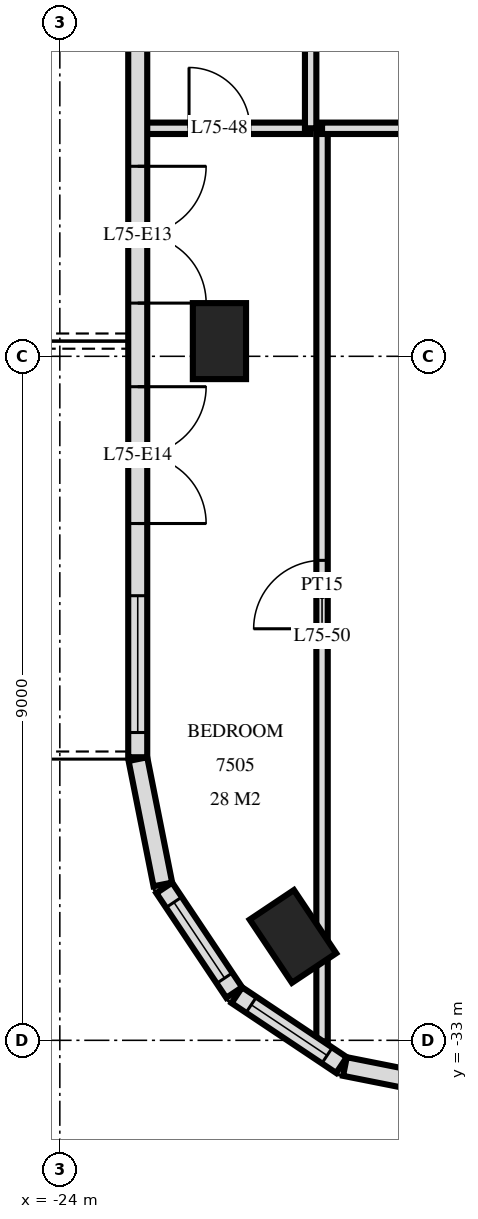
"""IFC4 building model, lengths in metres.
Left out: names, types, materials, properties, quantities, classifications, styles, units other than length and angle.
Written with IfcOpenShell. Run it as: python <this file> out.ifc"""

import sys

from ifc_helpers import new_model, si_unit, direction, frame, frame_2d, origin, origin_2d, place, context, subcontext, project, spatial, rectangle, extrude, element, fill, save


model = new_model("IFC4")
c1 = context("Model", 3, precision=1e-05, world=origin(), true_north=direction((0.0, 1.0)))
c2 = subcontext(c1, "Body", "Model", "MODEL_VIEW")
j1 = project(units=[si_unit("LENGTHUNIT", "METRE"), si_unit("PLANEANGLEUNIT", "RADIAN")], contexts=[c1])
p1 = place(None, origin())
s1 = spatial("IfcSite", under=j1, at=p1, CompositionType="ELEMENT")
p2 = place(p1, origin())
s2 = spatial("IfcBuilding", under=s1, at=p2, CompositionType="ELEMENT")
p3 = place(p2, frame((0.0, 0.0, 284.1)))
s3 = spatial("IfcBuildingStorey", under=s2, at=p3, CompositionType="ELEMENT", Elevation=284.1)
for number, where, z_axis, x_axis in (
    (1, (-21.9, -23.8, 0.0), (0.0, 0.0, 1.0), (0.0, 1.0, 0.0)),
    (2, (-20.933, -31.633, 0.0), (0.0, 0.0, 1.0), (-0.556, 0.831, 0.0)),
):
    element("IfcColumn", number, at=place(p3, frame(where, z_axis=z_axis, x_axis=x_axis)), inside=s3, PredefinedType="COLUMN", context=c2, shape_type="SweptSolid", body=[
        extrude(rectangle(XDim=1.0, YDim=0.7, at=origin_2d()), origin(), (0.0, 0.0, 1.0), 3.5),
    ])
p4 = place(p3, frame((-22.975, -3.325, 0.0), z_axis=(0.0, 0.0, 1.0), x_axis=(0.0, -1.0, 0.0)))
e3 = element("IfcWall", 3, at=p4, inside=s3, PredefinedType="SOLIDWALL", context=c2, shape_type="SweptSolid", body=[
    extrude(rectangle(XDim=25.951, YDim=0.25, at=frame_2d((12.975, 0.0))), origin(), (0.0, 0.0, 1.0), 3.22),
])
p5 = place(p4, frame((1.475, 0.0, 0.0)))
e4 = element("IfcOpeningElement", 4, at=p5, cuts=e3, PredefinedType="OPENING", context=c2, shape_type="SweptSolid", body=[
    extrude(rectangle(XDim=1.8, YDim=2.4, at=frame_2d((0.9, 1.2))), frame((0.0, 0.135, 0.0), z_axis=(0.0, -1.0, 0.0), x_axis=(1.0, 0.0, 0.0)), (0.0, 0.0, 1.0), 0.27),
])
p6 = place(p4, frame((7.975, 0.0, 0.0)))
e5 = element("IfcOpeningElement", 5, at=p6, cuts=e3, PredefinedType="OPENING", context=c2, shape_type="SweptSolid", body=[
    extrude(rectangle(XDim=1.8, YDim=2.4, at=frame_2d((0.9, 1.2))), frame((0.0, 0.135, 0.0), z_axis=(0.0, -1.0, 0.0), x_axis=(1.0, 0.0, 0.0)), (0.0, 0.0, 1.0), 0.27),
])
p7 = place(p4, frame((18.175, 0.0, 0.0)))
e6 = element("IfcOpeningElement", 6, at=p7, cuts=e3, PredefinedType="OPENING", context=c2, shape_type="SweptSolid", body=[
    extrude(rectangle(XDim=1.8, YDim=2.4, at=frame_2d((0.9, 1.2))), frame((0.0, 0.135, 0.0), z_axis=(0.0, -1.0, 0.0), x_axis=(1.0, 0.0, 0.0)), (0.0, 0.0, 1.0), 0.27),
])
p8 = place(p4, frame((21.075, 0.0, 0.0)))
e7 = element("IfcOpeningElement", 7, at=p8, cuts=e3, PredefinedType="OPENING", context=c2, shape_type="SweptSolid", body=[
    extrude(rectangle(XDim=1.8, YDim=2.4, at=frame_2d((0.9, 1.2))), frame((0.0, 0.135, 0.0), z_axis=(0.0, -1.0, 0.0), x_axis=(1.0, 0.0, 0.0)), (0.0, 0.0, 1.0), 0.27),
])
p9 = place(p4, frame((23.825, 0.0, 0.9)))
e8 = element("IfcOpeningElement", 8, at=p9, cuts=e3, PredefinedType="OPENING", context=c2, shape_type="SweptSolid", body=[
    extrude(rectangle(XDim=1.8, YDim=1.5, at=frame_2d((0.9, 0.75))), frame((0.0, 0.135, 0.0), z_axis=(0.0, -1.0, 0.0), x_axis=(1.0, 0.0, 0.0)), (0.0, 0.0, 1.0), 0.27),
])
p10 = place(p3, frame((-22.973, -29.3, 0.0), z_axis=(0.0, 0.0, 1.0), x_axis=(0.19513878023, -0.980775640221, 0.0)))
e9 = element("IfcWall", 9, at=p10, inside=s3, PredefinedType="SOLIDWALL", context=c2, shape_type="SweptSolid", body=[
    extrude(rectangle(XDim=1.681, YDim=0.25, at=frame_2d((0.841, 0.0))), origin(), (0.0, 0.0, 1.0), 3.22),
])
p11 = place(p3, frame((-22.626, -30.994, 0.0), z_axis=(0.0, 0.0, 1.0), x_axis=(0.55555029066, -0.831482937015, 0.0)))
e10 = element("IfcWall", 10, at=p11, inside=s3, PredefinedType="SOLIDWALL", context=c2, shape_type="SweptSolid", body=[
    extrude(rectangle(XDim=1.656, YDim=0.25, at=frame_2d((0.828, 0.0))), origin(), (0.0, 0.0, 1.0), 3.22),
])
p12 = place(p11, frame((0.228, 0.0, 0.9)))
e11 = element("IfcOpeningElement", 11, at=p12, cuts=e10, PredefinedType="OPENING", context=c2, shape_type="SweptSolid", body=[
    extrude(rectangle(XDim=1.2, YDim=1.5, at=frame_2d((0.6, 0.75))), frame((0.0, 0.135, 0.0), z_axis=(0.0, -1.0, 0.0), x_axis=(1.0, 0.0, 0.0)), (0.0, 0.0, 1.0), 0.27),
])
p13 = place(p3, frame((-21.671, -32.406, 0.0), z_axis=(0.0, 0.0, 1.0), x_axis=(0.831482937015, -0.55555029066, 0.0)))
e12 = element("IfcWall", 12, at=p13, inside=s3, PredefinedType="SOLIDWALL", context=c2, shape_type="SweptSolid", body=[
    extrude(rectangle(XDim=1.656, YDim=0.25, at=frame_2d((0.828, 0.0))), origin(), (0.0, 0.0, 1.0), 3.22),
])
p14 = place(p13, frame((0.228, 0.0, 0.9)))
e13 = element("IfcOpeningElement", 13, at=p14, cuts=e12, PredefinedType="OPENING", context=c2, shape_type="SweptSolid", body=[
    extrude(rectangle(XDim=1.2, YDim=1.5, at=frame_2d((0.6, 0.75))), frame((0.0, 0.135, 0.0), z_axis=(0.0, -1.0, 0.0), x_axis=(1.0, 0.0, 0.0)), (0.0, 0.0, 1.0), 0.27),
])
p15 = place(p3, frame((-20.249, -33.344, 0.0), z_axis=(0.0, 0.0, 1.0), x_axis=(0.980770110232, -0.195166572128, 0.0)))
e14 = element("IfcWall", 14, at=p15, inside=s3, PredefinedType="SOLIDWALL", context=c2, shape_type="SweptSolid", body=[
    extrude(rectangle(XDim=1.681, YDim=0.25, at=frame_2d((0.841, 0.0))), origin(), (0.0, 0.0, 1.0), 3.22),
])
p16 = place(p3, frame((-20.55, -33.017, 0.0), z_axis=(0.0, 0.0, 1.0), x_axis=(0.0, 1.0, 0.0)))
e15 = element("IfcWall", 15, at=p16, inside=s3, PredefinedType="PARTITIONING", context=c2, shape_type="SweptSolid", body=[
    extrude(rectangle(XDim=12.017, YDim=0.15, at=frame_2d((6.008, 0.0))), origin(), (0.0, 0.0, 1.0), 3.22),
])
p17 = place(p16, frame((5.432, 0.0, 0.0)))
e16 = element("IfcOpeningElement", 16, at=p17, cuts=e15, PredefinedType="OPENING", context=c2, shape_type="SweptSolid", body=[
    extrude(rectangle(XDim=0.9, YDim=2.1, at=frame_2d((0.45, 1.05))), frame((0.0, 0.085, 0.0), z_axis=(0.0, -1.0, 0.0), x_axis=(1.0, 0.0, 0.0)), (0.0, 0.0, 1.0), 0.17),
])
p18 = place(p3, frame((-20.7, -21.0, 0.0), z_axis=(0.0, 0.0, 1.0), x_axis=(0.0, 1.0, 0.0)))
e17 = element("IfcWall", 17, at=p18, inside=s3, PredefinedType="PARTITIONING", context=c2, shape_type="SweptSolid", body=[
    extrude(rectangle(XDim=4.2, YDim=0.15, at=frame_2d((2.1, 0.0))), origin(), (0.0, 0.0, 1.0), 3.22),
])
p19 = place(p3, frame((-22.92, -21.0, 0.0), z_axis=(0.0, 0.0, 1.0), x_axis=(1.0, 0.0, 0.0)))
e18 = element("IfcWall", 18, at=p19, inside=s3, PredefinedType="PARTITIONING", context=c2, shape_type="SweptSolid", body=[
    extrude(rectangle(XDim=2.22, YDim=0.15, at=frame_2d((1.11, 0.0))), origin(), (0.0, 0.0, 1.0), 3.22),
])
p20 = place(p19, frame((0.62, 0.0, 0.0)))
e19 = element("IfcOpeningElement", 19, at=p20, cuts=e18, PredefinedType="OPENING", context=c2, shape_type="SweptSolid", body=[
    extrude(rectangle(XDim=0.8, YDim=2.1, at=frame_2d((0.4, 1.05))), frame((0.0, 0.085, 0.0), z_axis=(0.0, -1.0, 0.0), x_axis=(1.0, 0.0, 0.0)), (0.0, 0.0, 1.0), 0.17),
])
p21 = place(p3, frame((-20.55, -21.0, 0.0), z_axis=(0.0, 0.0, 1.0), x_axis=(1.0, 0.0, 0.0)))
e20 = element("IfcWall", 20, at=p21, inside=s3, PredefinedType="PARTITIONING", context=c2, shape_type="SweptSolid", body=[
    extrude(rectangle(XDim=4.15, YDim=0.15, at=frame_2d((2.075, 0.0))), origin(), (0.0, 0.0, 1.0), 3.22),
])
p22 = place(p12, origin())
e21 = element("IfcWindow", 21, at=p22, inside=s3, PartitioningType="SINGLE_PANEL", PredefinedType="WINDOW", context=c2, shape_type="SweptSolid", body=[
    extrude(rectangle(XDim=1.2, YDim=1.5, at=frame_2d((0.6, 0.75))), frame((0.0, 0.03, 0.0), z_axis=(0.0, -1.0, 0.0), x_axis=(1.0, 0.0, 0.0)), (0.0, 0.0, 1.0), 0.06),
])
fill(e11, e21)
p23 = place(p14, origin())
e22 = element("IfcWindow", 22, at=p23, inside=s3, PartitioningType="SINGLE_PANEL", PredefinedType="WINDOW", context=c2, shape_type="SweptSolid", body=[
    extrude(rectangle(XDim=1.2, YDim=1.5, at=frame_2d((0.6, 0.75))), frame((0.0, 0.03, 0.0), z_axis=(0.0, -1.0, 0.0), x_axis=(1.0, 0.0, 0.0)), (0.0, 0.0, 1.0), 0.06),
])
fill(e13, e22)
p24 = place(p7, origin())
e23 = element("IfcDoor", 23, at=p24, inside=s3, OperationType="DOUBLE_DOOR_SINGLE_SWING", PredefinedType="DOOR", context=c2, shape_type="SweptSolid", body=[
    extrude(rectangle(XDim=1.8, YDim=2.4, at=frame_2d((0.9, 1.2))), frame((0.0, 0.025, 0.0), z_axis=(0.0, -1.0, 0.0), x_axis=(1.0, 0.0, 0.0)), (0.0, 0.0, 1.0), 0.05),
])
fill(e6, e23)
p25 = place(p8, origin())
e24 = element("IfcDoor", 24, at=p25, inside=s3, OperationType="DOUBLE_DOOR_SINGLE_SWING", PredefinedType="DOOR", context=c2, shape_type="SweptSolid", body=[
    extrude(rectangle(XDim=1.8, YDim=2.4, at=frame_2d((0.9, 1.2))), frame((0.0, 0.025, 0.0), z_axis=(0.0, -1.0, 0.0), x_axis=(1.0, 0.0, 0.0)), (0.0, 0.0, 1.0), 0.05),
])
fill(e7, e24)
p26 = place(p9, origin())
e25 = element("IfcWindow", 25, at=p26, inside=s3, PartitioningType="SINGLE_PANEL", PredefinedType="WINDOW", context=c2, shape_type="SweptSolid", body=[
    extrude(rectangle(XDim=1.8, YDim=1.5, at=frame_2d((0.9, 0.75))), frame((0.0, 0.03, 0.0), z_axis=(0.0, -1.0, 0.0), x_axis=(1.0, 0.0, 0.0)), (0.0, 0.0, 1.0), 0.06),
])
fill(e8, e25)
p27 = place(p20, origin())
e26 = element("IfcDoor", 26, at=p27, inside=s3, OperationType="SINGLE_SWING_RIGHT", PredefinedType="DOOR", context=c2, shape_type="SweptSolid", body=[
    extrude(rectangle(XDim=0.8, YDim=2.1, at=frame_2d((0.4, 1.05))), frame((0.0, 0.025, 0.0), z_axis=(0.0, -1.0, 0.0), x_axis=(1.0, 0.0, 0.0)), (0.0, 0.0, 1.0), 0.05),
])
fill(e19, e26)
p28 = place(p17, origin())
e27 = element("IfcDoor", 27, at=p28, inside=s3, OperationType="SINGLE_SWING_RIGHT", PredefinedType="DOOR", context=c2, shape_type="SweptSolid", body=[
    extrude(rectangle(XDim=0.9, YDim=2.1, at=frame_2d((0.45, 1.05))), frame((0.0, 0.025, 0.0), z_axis=(0.0, -1.0, 0.0), x_axis=(1.0, 0.0, 0.0)), (0.0, 0.0, 1.0), 0.05),
])
fill(e16, e27)
save(model, sys.argv[1])
